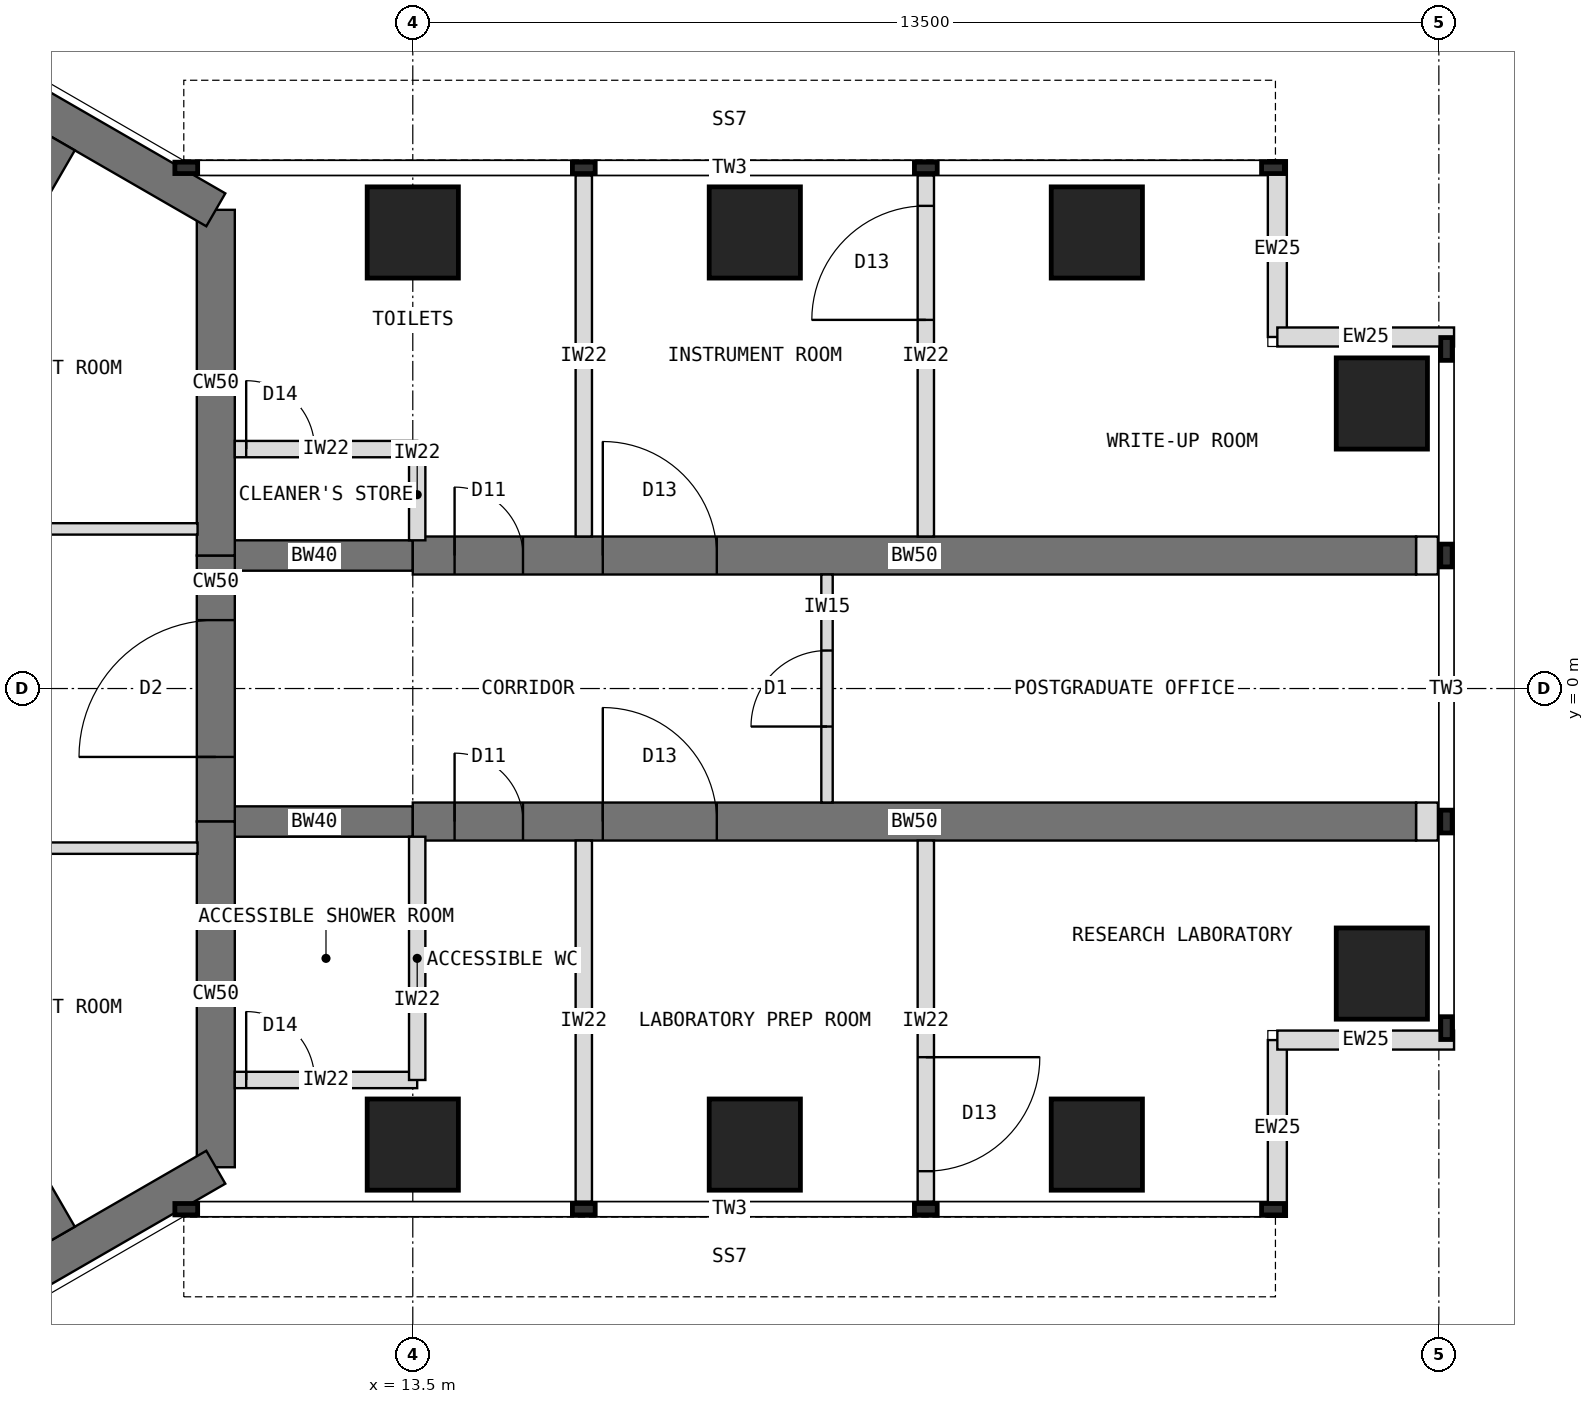
"""IFC4 building model, lengths in metres.
Left out: names, types, materials, properties, quantities, classifications, styles, units other than length and angle.
Written with IfcOpenShell. Run it as: python <this file> out.ifc"""

import sys

from ifc_helpers import new_model, si_unit, direction, frame, frame_2d, origin, origin_2d, place, context, subcontext, project, spatial, rectangle, extrude, element, fill, save


model = new_model("IFC4")
c1 = context("Model", 3, precision=1e-05, world=origin(), true_north=direction((0.0, 1.0)))
c2 = subcontext(c1, "Body", "Model", "MODEL_VIEW")
j1 = project(units=[si_unit("LENGTHUNIT", "METRE"), si_unit("PLANEANGLEUNIT", "RADIAN")], contexts=[c1])
p1 = place(None, origin())
s1 = spatial("IfcSite", under=j1, at=p1, CompositionType="ELEMENT")
p2 = place(p1, origin())
s2 = spatial("IfcBuilding", under=s1, at=p2, CompositionType="ELEMENT")
p3 = place(p2, frame((0.0, 0.0, 186.5)))
s3 = spatial("IfcBuildingStorey", under=s2, at=p3, CompositionType="ELEMENT", Elevation=186.5)
p4 = place(p3, frame((10.908, -6.298, 0.0), z_axis=(0.0, 0.0, 1.0), x_axis=(0.0, 1.0, 0.0)))
e1 = element("IfcWall", 1, at=p4, inside=s3, PredefinedType="SHEAR", context=c2, shape_type="SweptSolid", body=[
    extrude(rectangle(XDim=4.548, YDim=0.5, at=frame_2d((2.274, 0.0))), origin(), (0.0, 0.0, 1.0), 4.0),
])
p5 = place(p3, frame((10.908, -1.75, 0.0), z_axis=(0.0, 0.0, 1.0), x_axis=(0.0, 1.0, 0.0)))
e2 = element("IfcWall", 2, at=p5, inside=s3, PredefinedType="SHEAR", context=c2, shape_type="SweptSolid", body=[
    extrude(rectangle(XDim=3.5, YDim=0.5, at=frame_2d((1.75, 0.0))), origin(), (0.0, 0.0, 1.0), 4.0),
])
p6 = place(p5, frame((0.85, 0.0, 0.0)))
e3 = element("IfcOpeningElement", 3, at=p6, cuts=e2, PredefinedType="OPENING", context=c2, shape_type="SweptSolid", body=[
    extrude(rectangle(XDim=1.8, YDim=2.1, at=frame_2d((0.9, 1.05))), frame((0.0, 0.26, 0.0), z_axis=(0.0, -1.0, 0.0), x_axis=(1.0, 0.0, 0.0)), (0.0, 0.0, 1.0), 0.52),
])
p7 = place(p3, frame((10.908, 1.75, 0.0), z_axis=(0.0, 0.0, 1.0), x_axis=(0.0, 1.0, 0.0)))
e4 = element("IfcWall", 4, at=p7, inside=s3, PredefinedType="SHEAR", context=c2, shape_type="SweptSolid", body=[
    extrude(rectangle(XDim=4.548, YDim=0.5, at=frame_2d((2.274, 0.0))), origin(), (0.0, 0.0, 1.0), 4.0),
])
for number, where, z_axis, x_axis in (
    (5, (10.908, 6.298, 0.0), (0.0, 0.0, 1.0), (-0.866, 0.5, 0.0)),
    (6, (0.0, -12.596, 0.0), (0.0, 0.0, 1.0), (0.866, 0.5, 0.0)),
):
    element("IfcWall", number, at=place(p3, frame(where, z_axis=z_axis, x_axis=x_axis)), inside=s3, PredefinedType="SHEAR", context=c2, shape_type="SweptSolid", body=[
        extrude(rectangle(XDim=12.596, YDim=0.5, at=frame_2d((6.298, 0.0))), origin(), (0.0, 0.0, 1.0), 4.0),
    ])
p8 = place(p3, frame((10.908, 1.75, 0.0), z_axis=(0.0, 0.0, 1.0), x_axis=(1.0, 0.0, 0.0)))
e7 = element("IfcWall", 7, at=p8, inside=s3, PredefinedType="SHEAR", context=c2, shape_type="SweptSolid", body=[
    extrude(rectangle(XDim=2.592, YDim=0.4, at=frame_2d((1.296, 0.0))), origin(), (0.0, 0.0, 1.0), 4.0),
])
p9 = place(p3, frame((13.5, 1.75, 0.0), z_axis=(0.0, 0.0, 1.0), x_axis=(1.0, 0.0, 0.0)))
e8 = element("IfcWall", 8, at=p9, inside=s3, PredefinedType="SHEAR", context=c2, shape_type="SweptSolid", body=[
    extrude(rectangle(XDim=13.2, YDim=0.5, at=frame_2d((6.6, 0.0))), origin(), (0.0, 0.0, 1.0), 4.0),
])
p10 = place(p9, frame((0.55, 0.0, 0.0)))
e9 = element("IfcOpeningElement", 9, at=p10, cuts=e8, PredefinedType="OPENING", context=c2, shape_type="SweptSolid", body=[
    extrude(rectangle(XDim=0.9, YDim=2.1, at=frame_2d((0.45, 1.05))), frame((0.0, 0.26, 0.0), z_axis=(0.0, -1.0, 0.0), x_axis=(1.0, 0.0, 0.0)), (0.0, 0.0, 1.0), 0.52),
])
p11 = place(p9, frame((2.5, 0.0, 0.0)))
e10 = element("IfcOpeningElement", 10, at=p11, cuts=e8, PredefinedType="OPENING", context=c2, shape_type="SweptSolid", body=[
    extrude(rectangle(XDim=1.5, YDim=2.1, at=frame_2d((0.75, 1.05))), frame((0.0, 0.26, 0.0), z_axis=(0.0, -1.0, 0.0), x_axis=(1.0, 0.0, 0.0)), (0.0, 0.0, 1.0), 0.52),
])
p12 = place(p3, frame((10.908, -1.75, 0.0), z_axis=(0.0, 0.0, 1.0), x_axis=(1.0, 0.0, 0.0)))
e11 = element("IfcWall", 11, at=p12, inside=s3, PredefinedType="SHEAR", context=c2, shape_type="SweptSolid", body=[
    extrude(rectangle(XDim=2.592, YDim=0.4, at=frame_2d((1.296, 0.0))), origin(), (0.0, 0.0, 1.0), 4.0),
])
p13 = place(p3, frame((13.5, -1.75, 0.0), z_axis=(0.0, 0.0, 1.0), x_axis=(1.0, 0.0, 0.0)))
e12 = element("IfcWall", 12, at=p13, inside=s3, PredefinedType="SHEAR", context=c2, shape_type="SweptSolid", body=[
    extrude(rectangle(XDim=13.2, YDim=0.5, at=frame_2d((6.6, 0.0))), origin(), (0.0, 0.0, 1.0), 4.0),
])
p14 = place(p13, frame((0.55, 0.0, 0.0)))
e13 = element("IfcOpeningElement", 13, at=p14, cuts=e12, PredefinedType="OPENING", context=c2, shape_type="SweptSolid", body=[
    extrude(rectangle(XDim=0.9, YDim=2.1, at=frame_2d((0.45, 1.05))), frame((0.0, 0.26, 0.0), z_axis=(0.0, -1.0, 0.0), x_axis=(1.0, 0.0, 0.0)), (0.0, 0.0, 1.0), 0.52),
])
p15 = place(p13, frame((2.5, 0.0, 0.0)))
e14 = element("IfcOpeningElement", 14, at=p15, cuts=e12, PredefinedType="OPENING", context=c2, shape_type="SweptSolid", body=[
    extrude(rectangle(XDim=1.5, YDim=2.1, at=frame_2d((0.75, 1.05))), frame((0.0, 0.26, 0.0), z_axis=(0.0, -1.0, 0.0), x_axis=(1.0, 0.0, 0.0)), (0.0, 0.0, 1.0), 0.52),
])
for number, where, z_axis, x_axis in (
    (15, (13.5, 6.0, 0.0), (0.0, 0.0, 1.0), (1.0, 0.0, 0.0)),
    (16, (13.5, -6.0, 0.0), (0.0, 0.0, 1.0), (1.0, 0.0, 0.0)),
    (17, (18.0, 6.0, 0.0), (0.0, 0.0, 1.0), (1.0, 0.0, 0.0)),
    (18, (18.0, -6.0, 0.0), (0.0, 0.0, 1.0), (1.0, 0.0, 0.0)),
    (19, (22.5, 6.0, 0.0), (0.0, 0.0, 1.0), (1.0, 0.0, 0.0)),
    (20, (22.5, -6.0, 0.0), (0.0, 0.0, 1.0), (1.0, 0.0, 0.0)),
    (21, (26.25, 3.75, 0.0), (0.0, 0.0, 1.0), (1.0, 0.0, 0.0)),
    (22, (26.25, -3.75, 0.0), (0.0, 0.0, 1.0), (1.0, 0.0, 0.0)),
):
    element("IfcColumn", number, at=place(p3, frame(where, z_axis=z_axis, x_axis=x_axis)), inside=s3, PredefinedType="COLUMN", context=c2, shape_type="SweptSolid", body=[
        extrude(rectangle(XDim=1.2, YDim=1.2, at=origin_2d()), origin(), (0.0, 0.0, 1.0), 4.0),
    ])
for number, where, z_axis, x_axis in (
    (23, (24.875, 6.95, 0.0), (0.0, 0.0, 1.0), (0.0, -1.0, 0.0)),
    (24, (24.875, 4.625, 0.0), (0.0, 0.0, 1.0), (1.0, 0.0, 0.0)),
    (25, (24.875, -6.95, 0.0), (0.0, 0.0, 1.0), (0.0, 1.0, 0.0)),
    (26, (24.875, -4.625, 0.0), (0.0, 0.0, 1.0), (1.0, 0.0, 0.0)),
):
    element("IfcWall", number, at=place(p3, frame(where, z_axis=z_axis, x_axis=x_axis)), inside=s3, PredefinedType="STANDARD", context=c2, shape_type="SweptSolid", body=[
        extrude(rectangle(XDim=2.325, YDim=0.25, at=frame_2d((1.163, 0.0))), origin(), (0.0, 0.0, 1.0), 3.8),
    ])
for number, where, z_axis, x_axis in (
    (27, (26.7, 1.75, 0.0), (0.0, 0.0, 1.0), (1.0, 0.0, 0.0)),
    (28, (26.7, -1.75, 0.0), (0.0, 0.0, 1.0), (1.0, 0.0, 0.0)),
):
    element("IfcWall", number, at=place(p3, frame(where, z_axis=z_axis, x_axis=x_axis)), inside=s3, PredefinedType="PARTITIONING", context=c2, shape_type="SweptSolid", body=[
        extrude(rectangle(XDim=0.288, YDim=0.5, at=frame_2d((0.144, 0.0))), origin(), (0.0, 0.0, 1.0), 3.8),
    ])
for number, where, z_axis, x_axis in (
    (29, (5.901, 2.02, 0.0), (0.0, 0.0, 1.0), (0.5, 0.866, 0.0)),
    (30, (5.901, -2.02, 0.0), (0.0, 0.0, 1.0), (0.5, -0.866, 0.0)),
):
    element("IfcWall", number, at=place(p3, frame(where, z_axis=z_axis, x_axis=x_axis)), inside=s3, PredefinedType="SHEAR", context=c2, shape_type="SweptSolid", body=[
        extrude(rectangle(XDim=5.958, YDim=0.4, at=frame_2d((2.979, 0.0))), origin(), (0.0, 0.0, 1.0), 4.0),
    ])
p16 = place(p3, frame((15.75, 2.0, 0.0), z_axis=(0.0, 0.0, 1.0), x_axis=(0.0, 1.0, 0.0)))
e31 = element("IfcWall", 31, at=p16, inside=s3, PredefinedType="PARTITIONING", context=c2, shape_type="SweptSolid", body=[
    extrude(rectangle(XDim=4.75, YDim=0.215, at=frame_2d((2.375, 0.0))), origin(), (0.0, 0.0, 1.0), 3.8),
])
p17 = place(p3, frame((20.25, 2.0, 0.0), z_axis=(0.0, 0.0, 1.0), x_axis=(0.0, 1.0, 0.0)))
e32 = element("IfcWall", 32, at=p17, inside=s3, PredefinedType="PARTITIONING", context=c2, shape_type="SweptSolid", body=[
    extrude(rectangle(XDim=4.75, YDim=0.215, at=frame_2d((2.375, 0.0))), origin(), (0.0, 0.0, 1.0), 3.8),
])
p18 = place(p17, frame((2.85, 0.0, 0.0)))
e33 = element("IfcOpeningElement", 33, at=p18, cuts=e32, PredefinedType="OPENING", context=c2, shape_type="SweptSolid", body=[
    extrude(rectangle(XDim=1.5, YDim=2.1, at=frame_2d((0.75, 1.05))), frame((0.0, 0.117, 0.0), z_axis=(0.0, -1.0, 0.0), x_axis=(1.0, 0.0, 0.0)), (0.0, 0.0, 1.0), 0.235),
])
p19 = place(p3, frame((11.158, 3.15, 0.0), z_axis=(0.0, 0.0, 1.0), x_axis=(1.0, 0.0, 0.0)))
e34 = element("IfcWall", 34, at=p19, inside=s3, PredefinedType="PARTITIONING", context=c2, shape_type="SweptSolid", body=[
    extrude(rectangle(XDim=2.4, YDim=0.215, at=frame_2d((1.2, 0.0))), origin(), (0.0, 0.0, 1.0), 3.8),
])
p20 = place(p19, frame((0.15, 0.0, 0.0)))
e35 = element("IfcOpeningElement", 35, at=p20, cuts=e34, PredefinedType="OPENING", context=c2, shape_type="SweptSolid", body=[
    extrude(rectangle(XDim=0.9, YDim=2.1, at=frame_2d((0.45, 1.05))), frame((0.0, 0.117, 0.0), z_axis=(0.0, -1.0, 0.0), x_axis=(1.0, 0.0, 0.0)), (0.0, 0.0, 1.0), 0.235),
])
p21 = place(p3, frame((13.558, 1.95, 0.0), z_axis=(0.0, 0.0, 1.0), x_axis=(0.0, 1.0, 0.0)))
e36 = element("IfcWall", 36, at=p21, inside=s3, PredefinedType="PARTITIONING", context=c2, shape_type="SweptSolid", body=[
    extrude(rectangle(XDim=1.2, YDim=0.215, at=frame_2d((0.6, 0.0))), origin(), (0.0, 0.0, 1.0), 3.267),
])
p22 = place(p3, frame((15.75, -2.0, 0.0), z_axis=(0.0, 0.0, 1.0), x_axis=(0.0, -1.0, 0.0)))
e37 = element("IfcWall", 37, at=p22, inside=s3, PredefinedType="PARTITIONING", context=c2, shape_type="SweptSolid", body=[
    extrude(rectangle(XDim=4.75, YDim=0.215, at=frame_2d((2.375, 0.0))), origin(), (0.0, 0.0, 1.0), 3.8),
])
p23 = place(p3, frame((20.25, -2.0, 0.0), z_axis=(0.0, 0.0, 1.0), x_axis=(0.0, -1.0, 0.0)))
e38 = element("IfcWall", 38, at=p23, inside=s3, PredefinedType="PARTITIONING", context=c2, shape_type="SweptSolid", body=[
    extrude(rectangle(XDim=4.75, YDim=0.215, at=frame_2d((2.375, 0.0))), origin(), (0.0, 0.0, 1.0), 3.8),
])
p24 = place(p23, frame((2.85, 0.0, 0.0)))
e39 = element("IfcOpeningElement", 39, at=p24, cuts=e38, PredefinedType="OPENING", context=c2, shape_type="SweptSolid", body=[
    extrude(rectangle(XDim=1.5, YDim=2.1, at=frame_2d((0.75, 1.05))), frame((0.0, 0.117, 0.0), z_axis=(0.0, -1.0, 0.0), x_axis=(1.0, 0.0, 0.0)), (0.0, 0.0, 1.0), 0.235),
])
p25 = place(p3, frame((11.158, -5.15, 0.0), z_axis=(0.0, 0.0, 1.0), x_axis=(1.0, 0.0, 0.0)))
e40 = element("IfcWall", 40, at=p25, inside=s3, PredefinedType="PARTITIONING", context=c2, shape_type="SweptSolid", body=[
    extrude(rectangle(XDim=2.4, YDim=0.215, at=frame_2d((1.2, 0.0))), origin(), (0.0, 0.0, 1.0), 3.8),
])
p26 = place(p25, frame((0.15, 0.0, 0.0)))
e41 = element("IfcOpeningElement", 41, at=p26, cuts=e40, PredefinedType="OPENING", context=c2, shape_type="SweptSolid", body=[
    extrude(rectangle(XDim=0.9, YDim=2.1, at=frame_2d((0.45, 1.05))), frame((0.0, 0.117, 0.0), z_axis=(0.0, -1.0, 0.0), x_axis=(1.0, 0.0, 0.0)), (0.0, 0.0, 1.0), 0.235),
])
p27 = place(p3, frame((13.558, -1.95, 0.0), z_axis=(0.0, 0.0, 1.0), x_axis=(0.0, -1.0, 0.0)))
e42 = element("IfcWall", 42, at=p27, inside=s3, PredefinedType="PARTITIONING", context=c2, shape_type="SweptSolid", body=[
    extrude(rectangle(XDim=3.2, YDim=0.215, at=frame_2d((1.6, 0.0))), origin(), (0.0, 0.0, 1.0), 3.267),
])
p28 = place(p3, frame((6.143, 2.1, 0.0), z_axis=(0.0, 0.0, 1.0), x_axis=(1.0, 0.0, 0.0)))
e43 = element("IfcWall", 43, at=p28, inside=s3, PredefinedType="PARTITIONING", context=c2, shape_type="SweptSolid", body=[
    extrude(rectangle(XDim=4.526, YDim=0.15, at=frame_2d((2.263, 0.0))), origin(), (0.0, 0.0, 1.0), 3.8),
])
p29 = place(p28, frame((0.858, 0.0, 0.0)))
e44 = element("IfcOpeningElement", 44, at=p29, cuts=e43, PredefinedType="OPENING", context=c2, shape_type="SweptSolid", body=[
    extrude(rectangle(XDim=1.0, YDim=2.1, at=frame_2d((0.5, 1.05))), frame((0.0, 0.085, 0.0), z_axis=(0.0, -1.0, 0.0), x_axis=(1.0, 0.0, 0.0)), (0.0, 0.0, 1.0), 0.17),
])
p30 = place(p3, frame((10.668, -2.1, 0.0), z_axis=(0.0, 0.0, 1.0), x_axis=(-1.0, 0.0, 0.0)))
e45 = element("IfcWall", 45, at=p30, inside=s3, PredefinedType="PARTITIONING", context=c2, shape_type="SweptSolid", body=[
    extrude(rectangle(XDim=4.526, YDim=0.15, at=frame_2d((2.263, 0.0))), origin(), (0.0, 0.0, 1.0), 3.8),
])
p31 = place(p30, frame((2.668, 0.0, 0.0)))
e46 = element("IfcOpeningElement", 46, at=p31, cuts=e45, PredefinedType="OPENING", context=c2, shape_type="SweptSolid", body=[
    extrude(rectangle(XDim=1.0, YDim=2.1, at=frame_2d((0.5, 1.05))), frame((0.0, 0.085, 0.0), z_axis=(0.0, -1.0, 0.0), x_axis=(1.0, 0.0, 0.0)), (0.0, 0.0, 1.0), 0.17),
])
p32 = place(p3, frame((18.95, -1.5, 0.0), z_axis=(0.0, 0.0, 1.0), x_axis=(0.0, 1.0, 0.0)))
e47 = element("IfcWall", 47, at=p32, inside=s3, PredefinedType="PARTITIONING", context=c2, shape_type="SweptSolid", body=[
    extrude(rectangle(XDim=3.0, YDim=0.15, at=frame_2d((1.5, 0.0))), origin(), (0.0, 0.0, 1.0), 3.8),
])
p33 = place(p32, frame((1.0, 0.0, 0.0)))
e48 = element("IfcOpeningElement", 48, at=p33, cuts=e47, PredefinedType="OPENING", context=c2, shape_type="SweptSolid", body=[
    extrude(rectangle(XDim=1.0, YDim=2.1, at=frame_2d((0.5, 1.05))), frame((0.0, 0.085, 0.0), z_axis=(0.0, -1.0, 0.0), x_axis=(1.0, 0.0, 0.0)), (0.0, 0.0, 1.0), 0.17),
])
p34 = place(p6, origin())
e49 = element("IfcDoor", 49, at=p34, inside=s3, OperationType="DOUBLE_DOOR_DOUBLE_SWING", PredefinedType="DOOR", context=c2, shape_type="SweptSolid", body=[
    extrude(rectangle(XDim=1.8, YDim=2.1, at=frame_2d((0.9, 1.05))), frame((0.0, 0.025, 0.0), z_axis=(0.0, -1.0, 0.0), x_axis=(1.0, 0.0, 0.0)), (0.0, 0.0, 1.0), 0.05),
])
fill(e3, e49)
p35 = place(p18, origin())
e50 = element("IfcDoor", 50, at=p35, inside=s3, OperationType="DOUBLE_DOOR_SINGLE_SWING", PredefinedType="DOOR", context=c2, shape_type="SweptSolid", body=[
    extrude(rectangle(XDim=1.5, YDim=2.1, at=frame_2d((0.75, 1.05))), frame((0.0, 0.025, 0.0), z_axis=(0.0, -1.0, 0.0), x_axis=(1.0, 0.0, 0.0)), (0.0, 0.0, 1.0), 0.05),
])
fill(e33, e50)
p36 = place(p20, origin())
e51 = element("IfcDoor", 51, at=p36, inside=s3, OperationType="SINGLE_SWING_LEFT", PredefinedType="DOOR", context=c2, shape_type="SweptSolid", body=[
    extrude(rectangle(XDim=0.9, YDim=2.1, at=frame_2d((0.45, 1.05))), frame((0.0, 0.025, 0.0), z_axis=(0.0, -1.0, 0.0), x_axis=(1.0, 0.0, 0.0)), (0.0, 0.0, 1.0), 0.05),
])
fill(e35, e51)
p37 = place(p24, origin())
e52 = element("IfcDoor", 52, at=p37, inside=s3, OperationType="DOUBLE_DOOR_SINGLE_SWING", PredefinedType="DOOR", context=c2, shape_type="SweptSolid", body=[
    extrude(rectangle(XDim=1.5, YDim=2.1, at=frame_2d((0.75, 1.05))), frame((0.0, 0.025, 0.0), z_axis=(0.0, -1.0, 0.0), x_axis=(1.0, 0.0, 0.0)), (0.0, 0.0, 1.0), 0.05),
])
fill(e39, e52)
p38 = place(p26, origin())
e53 = element("IfcDoor", 53, at=p38, inside=s3, OperationType="SINGLE_SWING_LEFT", PredefinedType="DOOR", context=c2, shape_type="SweptSolid", body=[
    extrude(rectangle(XDim=0.9, YDim=2.1, at=frame_2d((0.45, 1.05))), frame((0.0, 0.025, 0.0), z_axis=(0.0, -1.0, 0.0), x_axis=(1.0, 0.0, 0.0)), (0.0, 0.0, 1.0), 0.05),
])
fill(e41, e53)
p39 = place(p33, origin())
e54 = element("IfcDoor", 54, at=p39, inside=s3, OperationType="SINGLE_SWING_LEFT", PredefinedType="DOOR", context=c2, shape_type="SweptSolid", body=[
    extrude(rectangle(XDim=1.0, YDim=2.1, at=frame_2d((0.5, 1.05))), frame((0.0, 0.025, 0.0), z_axis=(0.0, -1.0, 0.0), x_axis=(1.0, 0.0, 0.0)), (0.0, 0.0, 1.0), 0.05),
])
fill(e48, e54)
p40 = place(p10, origin())
e55 = element("IfcDoor", 55, at=p40, inside=s3, OperationType="SINGLE_SWING_LEFT", PredefinedType="DOOR", context=c2, shape_type="SweptSolid", body=[
    extrude(rectangle(XDim=0.9, YDim=2.1, at=frame_2d((0.45, 1.05))), frame((0.0, 0.025, 0.0), z_axis=(0.0, -1.0, 0.0), x_axis=(1.0, 0.0, 0.0)), (0.0, 0.0, 1.0), 0.05),
])
fill(e9, e55)
p41 = place(p11, origin())
e56 = element("IfcDoor", 56, at=p41, inside=s3, OperationType="DOUBLE_DOOR_SINGLE_SWING", PredefinedType="DOOR", context=c2, shape_type="SweptSolid", body=[
    extrude(rectangle(XDim=1.5, YDim=2.1, at=frame_2d((0.75, 1.05))), frame((0.0, 0.025, 0.0), z_axis=(0.0, -1.0, 0.0), x_axis=(1.0, 0.0, 0.0)), (0.0, 0.0, 1.0), 0.05),
])
fill(e10, e56)
p42 = place(p14, origin())
e57 = element("IfcDoor", 57, at=p42, inside=s3, OperationType="SINGLE_SWING_LEFT", PredefinedType="DOOR", context=c2, shape_type="SweptSolid", body=[
    extrude(rectangle(XDim=0.9, YDim=2.1, at=frame_2d((0.45, 1.05))), frame((0.0, 0.025, 0.0), z_axis=(0.0, -1.0, 0.0), x_axis=(1.0, 0.0, 0.0)), (0.0, 0.0, 1.0), 0.05),
])
fill(e13, e57)
p43 = place(p15, origin())
e58 = element("IfcDoor", 58, at=p43, inside=s3, OperationType="DOUBLE_DOOR_SINGLE_SWING", PredefinedType="DOOR", context=c2, shape_type="SweptSolid", body=[
    extrude(rectangle(XDim=1.5, YDim=2.1, at=frame_2d((0.75, 1.05))), frame((0.0, 0.025, 0.0), z_axis=(0.0, -1.0, 0.0), x_axis=(1.0, 0.0, 0.0)), (0.0, 0.0, 1.0), 0.05),
])
fill(e14, e58)
save(model, sys.argv[1])
